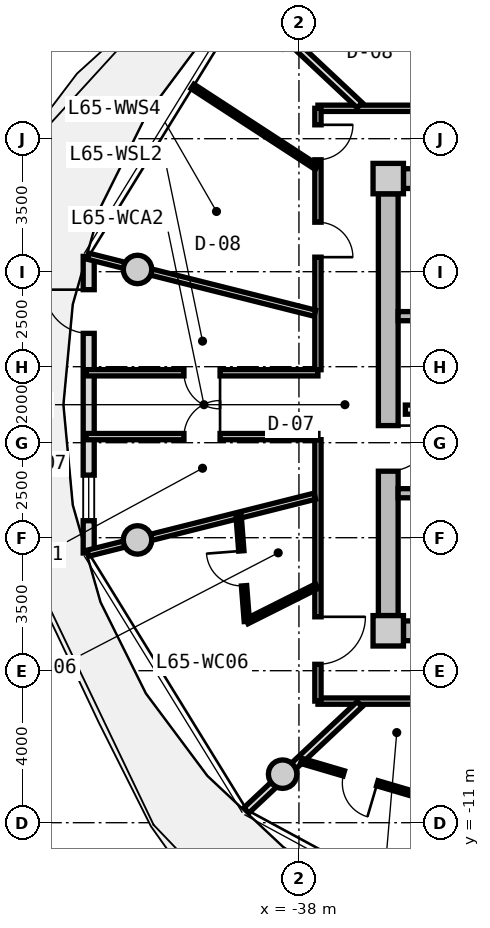
"""IFC4 building model, lengths in metres.
Left out: names, types, materials, properties, quantities, classifications, styles, units other than length and angle.
Written with IfcOpenShell. Run it as: python <this file> out.ifc"""

import sys

from ifc_helpers import new_model, si_unit, direction, frame, frame_2d, origin, origin_2d, place, context, subcontext, project, spatial, rectangle, circle, extrude, source, transform, mapped, element, fill, save


model = new_model("IFC4")
c1 = context("Model", 3, precision=1e-05, world=origin(), true_north=direction((0.0, 1.0)))
c2 = subcontext(c1, "Body", "Model", "MODEL_VIEW")
j1 = project(units=[si_unit("LENGTHUNIT", "METRE"), si_unit("PLANEANGLEUNIT", "RADIAN")], contexts=[c1])
p1 = place(None, origin())
s1 = spatial("IfcSite", under=j1, at=p1, CompositionType="ELEMENT")
p2 = place(p1, origin())
s2 = spatial("IfcBuilding", under=s1, at=p2, CompositionType="ELEMENT")
p3 = place(p2, frame((0.0, 0.0, 210.85)))
s3 = spatial("IfcBuildingStorey", under=s2, at=p3, CompositionType="ELEMENT", Elevation=210.85)
m1 = source(origin(), c2, "Body", "SweptSolid", [
    extrude(rectangle(XDim=0.8, YDim=0.8, at=origin_2d()), origin(), (0.0, 0.0, 1.0), 3.05),
])
for number, where, z_axis, x_axis in (
    (1, (-35.65, -5.95, 0.0), (0.0, 0.0, 1.0), (1.0, 0.0, 0.0)),
    (2, (-35.65, 5.95, 0.0), (0.0, 0.0, 1.0), (1.0, 0.0, 0.0)),
):
    element("IfcColumn", number, at=place(p3, frame(where, z_axis=z_axis, x_axis=x_axis)), inside=s3, PredefinedType="COLUMN", context=c2, shape_type="MappedRepresentation", body=[
        mapped(m1, transform((0.0, 0.0, 0.0), x_axis=(1.0, 0.0, 0.0), y_axis=(0.0, 1.0, 0.0), z_axis=(0.0, 0.0, 1.0), scale=1.0)),
    ])
m2 = source(origin(), c2, "Body", "SweptSolid", [
    extrude(rectangle(XDim=14.5, YDim=0.52, at=frame_2d((7.25, 0.0))), origin(), (0.0, 0.0, 1.0), 2.76),
])
for number, where, z_axis, x_axis in (
    (3, (-35.25, 5.95, 0.0), (0.0, 0.0, 1.0), (1.0, 0.0, 0.0)),
    (4, (-20.75, -5.95, 0.0), (0.0, 0.0, 1.0), (-1.0, 0.0, 0.0)),
):
    element("IfcWall", number, at=place(p3, frame(where, z_axis=z_axis, x_axis=x_axis)), inside=s3, PredefinedType="SHEAR", context=c2, shape_type="MappedRepresentation", body=[
        mapped(m2, transform((0.0, 0.0, 0.0), x_axis=(1.0, 0.0, 0.0), y_axis=(0.0, 1.0, 0.0), z_axis=(0.0, 0.0, 1.0), scale=1.0)),
    ])
m3 = source(origin(), c2, "Body", "SweptSolid", [
    extrude(rectangle(XDim=11.1, YDim=0.52, at=frame_2d((5.55, 0.0))), origin(), (0.0, 0.0, 1.0), 2.76),
])
p4 = place(p3, frame((-35.65, -5.55, 0.0), z_axis=(0.0, 0.0, 1.0), x_axis=(0.0, 1.0, 0.0)))
e5 = element("IfcWall", 5, at=p4, inside=s3, PredefinedType="SHEAR", context=c2, shape_type="MappedRepresentation", body=[
    mapped(m3, transform((0.0, 0.0, 0.0), x_axis=(1.0, 0.0, 0.0), y_axis=(0.0, 1.0, 0.0), z_axis=(0.0, 0.0, 1.0), scale=1.0)),
])
p5 = place(p4, frame((3.8, 0.0, 0.0)))
e6 = element("IfcOpeningElement", 6, at=p5, cuts=e5, PredefinedType="OPENING", context=c2, shape_type="SweptSolid", body=[
    extrude(rectangle(XDim=1.2, YDim=2.15, at=frame_2d((0.6, 1.075))), frame((0.0, 0.27, 0.0), z_axis=(0.0, -1.0, 0.0), x_axis=(1.0, 0.0, 0.0)), (0.0, 0.0, 1.0), 0.54),
])
m4 = source(origin(), c2, "Body", "SweptSolid", [
    extrude(circle(Radius=0.375, at=origin_2d()), origin(), (0.0, 0.0, 1.0), 3.05),
])
for number, where, z_axis, x_axis in (
    (7, (-42.247, 3.559, 0.0), (0.0, 0.0, 1.0), (1.0, 0.0, 0.0)),
    (8, (-42.247, -3.559, 0.0), (0.0, 0.0, 1.0), (1.0, 0.0, 0.0)),
    (9, (-38.43, -9.723, 0.0), (0.0, 0.0, 1.0), (1.0, 0.0, 0.0)),
):
    element("IfcColumn", number, at=place(p3, frame(where, z_axis=z_axis, x_axis=x_axis)), inside=s3, PredefinedType="COLUMN", context=c2, shape_type="MappedRepresentation", body=[
        mapped(m4, transform((0.0, 0.0, 0.0), x_axis=(1.0, 0.0, 0.0), y_axis=(0.0, 1.0, 0.0), z_axis=(0.0, 0.0, 1.0), scale=1.0)),
    ])
m5 = source(origin(), c2, "Body", "SweptSolid", [
    extrude(rectangle(XDim=7.806, YDim=0.29, at=frame_2d((3.903, 0.0))), origin(), (0.0, 0.0, 1.0), 2.76),
])
p6 = place(p3, frame((-43.532, -3.903, 0.0), z_axis=(0.0, 0.0, 1.0), x_axis=(0.0, 1.0, 0.0)))
e10 = element("IfcWall", 10, at=p6, inside=s3, PredefinedType="SOLIDWALL", context=c2, shape_type="MappedRepresentation", body=[
    mapped(m5, transform((0.0, 0.0, 0.0), x_axis=(1.0, 0.0, 0.0), y_axis=(0.0, 1.0, 0.0), z_axis=(0.0, 0.0, 1.0), scale=1.0)),
])
p7 = place(p6, frame((5.78, 0.0, 0.0)))
e11 = element("IfcOpeningElement", 11, at=p7, cuts=e10, PredefinedType="OPENING", context=c2, shape_type="SweptSolid", body=[
    extrude(rectangle(XDim=1.15, YDim=2.25, at=frame_2d((0.575, 1.125))), frame((0.0, 0.155, 0.0), z_axis=(0.0, -1.0, 0.0), x_axis=(1.0, 0.0, 0.0)), (0.0, 0.0, 1.0), 0.31),
])
p8 = place(p6, frame((0.85, 0.0, 0.85)))
e12 = element("IfcOpeningElement", 12, at=p8, cuts=e10, PredefinedType="OPENING", context=c2, shape_type="SweptSolid", body=[
    extrude(rectangle(XDim=1.2, YDim=1.5, at=frame_2d((0.6, 0.75))), frame((0.0, 0.155, 0.0), z_axis=(0.0, -1.0, 0.0), x_axis=(1.0, 0.0, 0.0)), (0.0, 0.0, 1.0), 0.31),
])
m6 = source(origin(), c2, "Body", "SweptSolid", [
    extrude(rectangle(XDim=7.93, YDim=0.24, at=frame_2d((3.965, 0.0))), origin(), (0.0, 0.0, 1.0), 2.76),
])
p9 = place(p3, frame((-35.39, 2.33, 0.0), z_axis=(0.0, 0.0, 1.0), x_axis=(1.0, 0.0, 0.0)))
e13 = element("IfcWall", 13, at=p9, inside=s3, PredefinedType="PARTITIONING", context=c2, shape_type="MappedRepresentation", body=[
    mapped(m6, transform((0.0, 0.0, 0.0), x_axis=(1.0, 0.0, 0.0), y_axis=(0.0, 1.0, 0.0), z_axis=(0.0, 0.0, 1.0), scale=1.0)),
])
p10 = place(p3, frame((-35.39, -2.33, 0.0), z_axis=(0.0, 0.0, 1.0), x_axis=(1.0, 0.0, 0.0)))
e14 = element("IfcWall", 14, at=p10, inside=s3, PredefinedType="PARTITIONING", context=c2, shape_type="MappedRepresentation", body=[
    mapped(m6, transform((0.0, 0.0, 0.0), x_axis=(1.0, 0.0, 0.0), y_axis=(0.0, 1.0, 0.0), z_axis=(0.0, 0.0, 1.0), scale=1.0)),
])
p11 = place(p10, frame((1.05, 0.0, 0.0)))
e15 = element("IfcOpeningElement", 15, at=p11, cuts=e14, PredefinedType="OPENING", context=c2, shape_type="SweptSolid", body=[
    extrude(rectangle(XDim=1.1, YDim=2.15, at=frame_2d((0.55, 1.075))), frame((0.0, 0.13, 0.0), z_axis=(0.0, -1.0, 0.0), x_axis=(1.0, 0.0, 0.0)), (0.0, 0.0, 1.0), 0.26),
])
m7 = source(origin(), c2, "Body", "SweptSolid", [
    extrude(rectangle(XDim=7.62, YDim=0.24, at=frame_2d((3.81, 0.0))), origin(), (0.0, 0.0, 1.0), 2.745),
])
p12 = place(p3, frame((-35.2, -0.13, 0.0), z_axis=(0.0, 0.0, 1.0), x_axis=(1.0, 0.0, 0.0)))
e16 = element("IfcWall", 16, at=p12, inside=s3, PredefinedType="PARTITIONING", context=c2, shape_type="MappedRepresentation", body=[
    mapped(m7, transform((0.0, 0.0, 0.0), x_axis=(1.0, 0.0, 0.0), y_axis=(0.0, 1.0, 0.0), z_axis=(0.0, 0.0, 1.0), scale=1.0)),
])
p13 = place(p12, frame((6.22, 0.0, 0.0)))
e17 = element("IfcOpeningElement", 17, at=p13, cuts=e16, PredefinedType="OPENING", context=c2, shape_type="SweptSolid", body=[
    extrude(rectangle(XDim=1.0, YDim=2.1, at=frame_2d((0.5, 1.05))), frame((0.0, 0.13, 0.0), z_axis=(0.0, -1.0, 0.0), x_axis=(1.0, 0.0, 0.0)), (0.0, 0.0, 1.0), 0.26),
])
p14 = place(p12, frame((2.4, 0.0, 0.0)))
e18 = element("IfcOpeningElement", 18, at=p14, cuts=e16, PredefinedType="OPENING", context=c2, shape_type="SweptSolid", body=[
    extrude(rectangle(XDim=1.0, YDim=2.1, at=frame_2d((0.5, 1.05))), frame((0.0, 0.13, 0.0), z_axis=(0.0, -1.0, 0.0), x_axis=(1.0, 0.0, 0.0)), (0.0, 0.0, 1.0), 0.26),
])
m8 = source(origin(), c2, "Body", "SweptSolid", [
    extrude(rectangle(XDim=8.58, YDim=0.165, at=frame_2d((4.29, 0.0))), origin(), (0.0, 0.0, 1.0), 2.745),
])
p15 = place(p3, frame((-37.5, 7.8, 0.0), z_axis=(0.0, 0.0, 1.0), x_axis=(1.0, 0.0, 0.0)))
e19 = element("IfcWall", 19, at=p15, inside=s3, PredefinedType="PARTITIONING", context=c2, shape_type="MappedRepresentation", body=[
    mapped(m8, transform((0.0, 0.0, 0.0), x_axis=(1.0, 0.0, 0.0), y_axis=(0.0, 1.0, 0.0), z_axis=(0.0, 0.0, 1.0), scale=1.0)),
])
p16 = place(p15, frame((3.528, 0.0, 0.0)))
e20 = element("IfcOpeningElement", 20, at=p16, cuts=e19, PredefinedType="OPENING", context=c2, shape_type="SweptSolid", body=[
    extrude(rectangle(XDim=1.25, YDim=2.2, at=frame_2d((0.625, 1.1))), frame((0.0, 0.093, 0.0), z_axis=(0.0, -1.0, 0.0), x_axis=(1.0, 0.0, 0.0)), (0.0, 0.0, 1.0), 0.185),
])
m9 = source(origin(), c2, "Body", "SweptSolid", [
    extrude(rectangle(XDim=19.0, YDim=0.165, at=frame_2d((9.5, 0.0))), origin(), (0.0, 0.0, 1.0), 2.745),
])
p17 = place(p3, frame((-18.5, -7.8, 0.0), z_axis=(0.0, 0.0, 1.0), x_axis=(-1.0, 0.0, 0.0)))
e21 = element("IfcWall", 21, at=p17, inside=s3, PredefinedType="PARTITIONING", context=c2, shape_type="MappedRepresentation", body=[
    mapped(m9, transform((0.0, 0.0, 0.0), x_axis=(1.0, 0.0, 0.0), y_axis=(0.0, 1.0, 0.0), z_axis=(0.0, 0.0, 1.0), scale=1.0)),
])
p18 = place(p17, frame((12.569, 0.0, 0.0)))
e22 = element("IfcOpeningElement", 22, at=p18, cuts=e21, PredefinedType="OPENING", context=c2, shape_type="SweptSolid", body=[
    extrude(rectangle(XDim=1.25, YDim=2.2, at=frame_2d((0.625, 1.1))), frame((0.0, 0.093, 0.0), z_axis=(0.0, -1.0, 0.0), x_axis=(1.0, 0.0, 0.0)), (0.0, 0.0, 1.0), 0.185),
])
p19 = place(p17, frame((8.875, 0.0, 0.0)))
e23 = element("IfcOpeningElement", 23, at=p19, cuts=e21, PredefinedType="OPENING", context=c2, shape_type="SweptSolid", body=[
    extrude(rectangle(XDim=1.25, YDim=2.2, at=frame_2d((0.625, 1.1))), frame((0.0, 0.093, 0.0), z_axis=(0.0, -1.0, 0.0), x_axis=(1.0, 0.0, 0.0)), (0.0, 0.0, 1.0), 0.185),
])
p20 = place(p17, frame((3.559, 0.0, 0.0)))
e24 = element("IfcOpeningElement", 24, at=p20, cuts=e21, PredefinedType="OPENING", context=c2, shape_type="SweptSolid", body=[
    extrude(rectangle(XDim=1.25, YDim=2.2, at=frame_2d((0.625, 1.1))), frame((0.0, 0.093, 0.0), z_axis=(0.0, -1.0, 0.0), x_axis=(1.0, 0.0, 0.0)), (0.0, 0.0, 1.0), 0.185),
])
m10 = source(origin(), c2, "Body", "SweptSolid", [
    extrude(rectangle(XDim=6.88, YDim=0.165, at=frame_2d((3.44, 0.0))), origin(), (0.0, 0.0, 1.0), 2.745),
])
p21 = place(p3, frame((-37.5, -7.8, 0.0), z_axis=(0.0, 0.0, 1.0), x_axis=(0.0, 1.0, 0.0)))
e25 = element("IfcWall", 25, at=p21, inside=s3, PredefinedType="PARTITIONING", context=c2, shape_type="MappedRepresentation", body=[
    mapped(m10, transform((0.0, 0.0, 0.0), x_axis=(1.0, 0.0, 0.0), y_axis=(0.0, 1.0, 0.0), z_axis=(0.0, 0.0, 1.0), scale=1.0)),
])
p22 = place(p21, frame((0.968, 0.0, 0.0)))
e26 = element("IfcOpeningElement", 26, at=p22, cuts=e25, PredefinedType="OPENING", context=c2, shape_type="SweptSolid", body=[
    extrude(rectangle(XDim=1.25, YDim=2.2, at=frame_2d((0.625, 1.1))), frame((0.0, 0.093, 0.0), z_axis=(0.0, -1.0, 0.0), x_axis=(1.0, 0.0, 0.0)), (0.0, 0.0, 1.0), 0.185),
])
p23 = place(p3, frame((-37.5, 0.92, 0.0), z_axis=(0.0, 0.0, 1.0), x_axis=(0.0, 1.0, 0.0)))
e27 = element("IfcWall", 27, at=p23, inside=s3, PredefinedType="PARTITIONING", context=c2, shape_type="MappedRepresentation", body=[
    mapped(m10, transform((0.0, 0.0, 0.0), x_axis=(1.0, 0.0, 0.0), y_axis=(0.0, 1.0, 0.0), z_axis=(0.0, 0.0, 1.0), scale=1.0)),
])
p24 = place(p23, frame((5.525, 0.0, 0.0)))
e28 = element("IfcOpeningElement", 28, at=p24, cuts=e27, PredefinedType="OPENING", context=c2, shape_type="SweptSolid", body=[
    extrude(rectangle(XDim=0.92, YDim=2.1, at=frame_2d((0.46, 1.05))), frame((0.0, 0.093, 0.0), z_axis=(0.0, -1.0, 0.0), x_axis=(1.0, 0.0, 0.0)), (0.0, 0.0, 1.0), 0.185),
])
p25 = place(p23, frame((2.962, 0.0, 0.0)))
e29 = element("IfcOpeningElement", 29, at=p25, cuts=e27, PredefinedType="OPENING", context=c2, shape_type="SweptSolid", body=[
    extrude(rectangle(XDim=0.92, YDim=2.1, at=frame_2d((0.46, 1.05))), frame((0.0, 0.093, 0.0), z_axis=(0.0, -1.0, 0.0), x_axis=(1.0, 0.0, 0.0)), (0.0, 0.0, 1.0), 0.185),
])
m11 = source(origin(), c2, "Body", "SweptSolid", [
    extrude(rectangle(XDim=6.157, YDim=0.165, at=frame_2d((3.079, 0.0))), origin(), (0.0, 0.0, 1.0), 2.345),
])
for number, where, z_axis, x_axis in (
    (30, (-37.58, 2.407, 0.0), (0.0, 0.0, 1.0), (-0.97, 0.244, 0.0)),
    (31, (-37.58, -2.407, 0.0), (0.0, 0.0, 1.0), (-0.97, -0.244, 0.0)),
):
    element("IfcWall", number, at=place(p3, frame(where, z_axis=z_axis, x_axis=x_axis)), inside=s3, PredefinedType="PARTITIONING", context=c2, shape_type="MappedRepresentation", body=[
        mapped(m11, transform((0.0, 0.0, 0.0), x_axis=(1.0, 0.0, 0.0), y_axis=(0.0, 1.0, 0.0), z_axis=(0.0, 0.0, 1.0), scale=1.0)),
    ])
m12 = source(origin(), c2, "Body", "SweptSolid", [
    extrude(rectangle(XDim=6.101, YDim=0.165, at=frame_2d((3.051, 0.0))), origin(), (0.0, 0.0, 1.0), 2.745),
])
p26 = place(p3, frame((-43.601, 0.84, 0.0), z_axis=(0.0, 0.0, 1.0), x_axis=(1.0, 0.0, 0.0)))
e32 = element("IfcWall", 32, at=p26, inside=s3, PredefinedType="PARTITIONING", context=c2, shape_type="MappedRepresentation", body=[
    mapped(m12, transform((0.0, 0.0, 0.0), x_axis=(1.0, 0.0, 0.0), y_axis=(0.0, 1.0, 0.0), z_axis=(0.0, 0.0, 1.0), scale=1.0)),
])
p27 = place(p26, frame((2.576, 0.0, 0.0)))
e33 = element("IfcOpeningElement", 33, at=p27, cuts=e32, PredefinedType="OPENING", context=c2, shape_type="SweptSolid", body=[
    extrude(rectangle(XDim=0.95, YDim=2.1, at=frame_2d((0.475, 1.05))), frame((0.0, 0.093, 0.0), z_axis=(0.0, -1.0, 0.0), x_axis=(1.0, 0.0, 0.0)), (0.0, 0.0, 1.0), 0.185),
])
p28 = place(p3, frame((-37.5, -0.84, 0.0), z_axis=(0.0, 0.0, 1.0), x_axis=(-1.0, 0.0, 0.0)))
e34 = element("IfcWall", 34, at=p28, inside=s3, PredefinedType="PARTITIONING", context=c2, shape_type="MappedRepresentation", body=[
    mapped(m12, transform((0.0, 0.0, 0.0), x_axis=(1.0, 0.0, 0.0), y_axis=(0.0, 1.0, 0.0), z_axis=(0.0, 0.0, 1.0), scale=1.0)),
])
p29 = place(p28, frame((2.576, 0.0, 0.0)))
e35 = element("IfcOpeningElement", 35, at=p29, cuts=e34, PredefinedType="OPENING", context=c2, shape_type="SweptSolid", body=[
    extrude(rectangle(XDim=0.95, YDim=2.1, at=frame_2d((0.475, 1.05))), frame((0.0, 0.093, 0.0), z_axis=(0.0, -1.0, 0.0), x_axis=(1.0, 0.0, 0.0)), (0.0, 0.0, 1.0), 0.185),
])
m13 = source(origin(), c2, "Body", "SweptSolid", [
    extrude(rectangle(XDim=4.089, YDim=0.19, at=frame_2d((2.044, 0.0))), origin(), (0.0, 0.0, 1.0), 2.345),
])
p30 = place(p3, frame((-36.402, 7.88, 0.0), z_axis=(0.0, 0.0, 1.0), x_axis=(-0.729401273609, 0.684086092577, 0.0)))
e36 = element("IfcWall", 36, at=p30, inside=s3, PredefinedType="PARTITIONING", context=c2, shape_type="MappedRepresentation", body=[
    mapped(m13, transform((0.0, 0.0, 0.0), x_axis=(1.0, 0.0, 0.0), y_axis=(0.0, 1.0, 0.0), z_axis=(0.0, 0.0, 1.0), scale=1.0)),
])
m14 = source(origin(), c2, "Body", "SweptSolid", [
    extrude(rectangle(XDim=3.904, YDim=0.14, at=frame_2d((1.952, 0.0))), origin(), (0.0, 0.0, 1.0), 2.745),
])
p31 = place(p3, frame((-37.53, 6.246, 0.0), z_axis=(0.0, 0.0, 1.0), x_axis=(-0.838024687996, 0.545632314209, 0.0)))
e37 = element("IfcWall", 37, at=p31, inside=s3, PredefinedType="PARTITIONING", context=c2, shape_type="MappedRepresentation", body=[
    mapped(m14, transform((0.0, 0.0, 0.0), x_axis=(1.0, 0.0, 0.0), y_axis=(0.0, 1.0, 0.0), z_axis=(0.0, 0.0, 1.0), scale=1.0)),
])
p32 = place(p3, frame((-36.402, -7.88, 0.0), z_axis=(0.0, 0.0, 1.0), x_axis=(-0.729401273609, -0.684086092577, 0.0)))
e38 = element("IfcWall", 38, at=p32, inside=s3, PredefinedType="PARTITIONING", context=c2, shape_type="MappedRepresentation", body=[
    mapped(m13, transform((0.0, 0.0, 0.0), x_axis=(1.0, 0.0, 0.0), y_axis=(0.0, 1.0, 0.0), z_axis=(0.0, 0.0, 1.0), scale=1.0)),
])
m15 = source(origin(), c2, "Body", "SweptSolid", [
    extrude(rectangle(XDim=2.06, YDim=0.14, at=frame_2d((1.03, 0.0))), origin(), (0.0, 0.0, 1.0), 2.745),
])
p33 = place(p3, frame((-37.53, -4.778, 0.0), z_axis=(0.0, 0.0, 1.0), x_axis=(-0.893952568722, -0.448161583444, 0.0)))
e39 = element("IfcWall", 39, at=p33, inside=s3, PredefinedType="PARTITIONING", context=c2, shape_type="MappedRepresentation", body=[
    mapped(m15, transform((0.0, 0.0, 0.0), x_axis=(1.0, 0.0, 0.0), y_axis=(0.0, 1.0, 0.0), z_axis=(0.0, 0.0, 1.0), scale=1.0)),
])
m16 = source(origin(), c2, "Body", "SweptSolid", [
    extrude(rectangle(XDim=2.798, YDim=0.14, at=frame_2d((1.399, 0.0))), origin(), (0.0, 0.0, 1.0), 2.745),
])
p34 = place(p3, frame((-39.371, -5.701, 0.0), z_axis=(0.0, 0.0, 1.0), x_axis=(-0.077823984089, 0.996967114553, 0.0)))
e40 = element("IfcWall", 40, at=p34, inside=s3, PredefinedType="PARTITIONING", context=c2, shape_type="MappedRepresentation", body=[
    mapped(m16, transform((0.0, 0.0, 0.0), x_axis=(1.0, 0.0, 0.0), y_axis=(0.0, 1.0, 0.0), z_axis=(0.0, 0.0, 1.0), scale=1.0)),
])
p35 = place(p34, frame((0.939, 0.0, 0.0)))
e41 = element("IfcOpeningElement", 41, at=p35, cuts=e40, PredefinedType="OPENING", context=c2, shape_type="SweptSolid", body=[
    extrude(rectangle(XDim=0.92, YDim=2.1, at=frame_2d((0.46, 1.05))), frame((0.0, 0.08, 0.0), z_axis=(0.0, -1.0, 0.0), x_axis=(1.0, 0.0, 0.0)), (0.0, 0.0, 1.0), 0.16),
])
m17 = source(origin(), c2, "Body", "SweptSolid", [
    extrude(rectangle(XDim=3.252, YDim=0.14, at=frame_2d((1.626, 0.0))), origin(), (0.0, 0.0, 1.0), 2.745),
])
p36 = place(p3, frame((-34.82, -10.291, 0.0), z_axis=(0.0, 0.0, 1.0), x_axis=(-0.959294945864, 0.282406102695, 0.0)))
e42 = element("IfcWall", 42, at=p36, inside=s3, PredefinedType="PARTITIONING", context=c2, shape_type="MappedRepresentation", body=[
    mapped(m17, transform((0.0, 0.0, 0.0), x_axis=(1.0, 0.0, 0.0), y_axis=(0.0, 1.0, 0.0), z_axis=(0.0, 0.0, 1.0), scale=1.0)),
])
p37 = place(p36, frame((1.166, 0.0, 0.0)))
e43 = element("IfcOpeningElement", 43, at=p37, cuts=e42, PredefinedType="OPENING", context=c2, shape_type="SweptSolid", body=[
    extrude(rectangle(XDim=0.92, YDim=2.1, at=frame_2d((0.46, 1.05))), frame((0.0, 0.08, 0.0), z_axis=(0.0, -1.0, 0.0), x_axis=(1.0, 0.0, 0.0)), (0.0, 0.0, 1.0), 0.16),
])
m18 = source(origin(), c2, "Body", "SweptSolid", [
    extrude(rectangle(XDim=1.15, YDim=2.25, at=frame_2d((0.575, 1.125))), frame((0.0, 0.025, 0.0), z_axis=(0.0, -1.0, 0.0), x_axis=(1.0, 0.0, 0.0)), (0.0, 0.0, 1.0), 0.05),
])
p38 = place(p7, origin())
e44 = element("IfcDoor", 44, at=p38, inside=s3, OperationType="SINGLE_SWING_RIGHT", PredefinedType="DOOR", context=c2, shape_type="MappedRepresentation", body=[
    mapped(m18, transform((0.0, 0.0, 0.0), x_axis=(1.0, 0.0, 0.0), y_axis=(0.0, 1.0, 0.0), z_axis=(0.0, 0.0, 1.0), scale=1.0)),
])
fill(e11, e44)
m19 = source(origin(), c2, "Body", "SweptSolid", [
    extrude(rectangle(XDim=1.2, YDim=1.5, at=frame_2d((0.6, 0.75))), frame((0.0, 0.03, 0.0), z_axis=(0.0, -1.0, 0.0), x_axis=(1.0, 0.0, 0.0)), (0.0, 0.0, 1.0), 0.06),
])
p39 = place(p8, origin())
e45 = element("IfcWindow", 45, at=p39, inside=s3, PartitioningType="SINGLE_PANEL", PredefinedType="WINDOW", context=c2, shape_type="MappedRepresentation", body=[
    mapped(m19, transform((0.0, 0.0, 0.0), x_axis=(1.0, 0.0, 0.0), y_axis=(0.0, 1.0, 0.0), z_axis=(0.0, 0.0, 1.0), scale=1.0)),
])
fill(e12, e45)
m20 = source(origin(), c2, "Body", "SweptSolid", [
    extrude(rectangle(XDim=1.2, YDim=2.15, at=frame_2d((0.6, 1.075))), frame((0.0, 0.025, 0.0), z_axis=(0.0, -1.0, 0.0), x_axis=(1.0, 0.0, 0.0)), (0.0, 0.0, 1.0), 0.05),
])
p40 = place(p5, frame((1.2, 0.0, 0.0), z_axis=(0.0, 0.0, 1.0), x_axis=(-1.0, 0.0, 0.0)))
e46 = element("IfcDoor", 46, at=p40, inside=s3, OperationType="SINGLE_SWING_LEFT", PredefinedType="DOOR", context=c2, shape_type="MappedRepresentation", body=[
    mapped(m20, transform((0.0, 0.0, 0.0), x_axis=(1.0, 0.0, 0.0), y_axis=(0.0, 1.0, 0.0), z_axis=(0.0, 0.0, 1.0), scale=1.0)),
])
fill(e6, e46)
m21 = source(origin(), c2, "Body", "SweptSolid", [
    extrude(rectangle(XDim=0.95, YDim=2.1, at=frame_2d((0.475, 1.05))), frame((0.0, 0.025, 0.0), z_axis=(0.0, -1.0, 0.0), x_axis=(1.0, 0.0, 0.0)), (0.0, 0.0, 1.0), 0.05),
])
p41 = place(p29, frame((0.95, 0.0, 0.0), z_axis=(0.0, 0.0, 1.0), x_axis=(-1.0, 0.0, 0.0)))
e47 = element("IfcDoor", 47, at=p41, inside=s3, OperationType="SINGLE_SWING_RIGHT", PredefinedType="DOOR", context=c2, shape_type="MappedRepresentation", body=[
    mapped(m21, transform((0.0, 0.0, 0.0), x_axis=(1.0, 0.0, 0.0), y_axis=(0.0, 1.0, 0.0), z_axis=(0.0, 0.0, 1.0), scale=1.0)),
])
fill(e35, e47)
p42 = place(p27, frame((0.95, 0.0, 0.0), z_axis=(0.0, 0.0, 1.0), x_axis=(-1.0, 0.0, 0.0)))
e48 = element("IfcDoor", 48, at=p42, inside=s3, OperationType="SINGLE_SWING_LEFT", PredefinedType="DOOR", context=c2, shape_type="MappedRepresentation", body=[
    mapped(m21, transform((0.0, 0.0, 0.0), x_axis=(1.0, 0.0, 0.0), y_axis=(0.0, 1.0, 0.0), z_axis=(0.0, 0.0, 1.0), scale=1.0)),
])
fill(e33, e48)
m22 = source(origin(), c2, "Body", "SweptSolid", [
    extrude(rectangle(XDim=0.92, YDim=2.1, at=frame_2d((0.46, 1.05))), frame((0.0, 0.025, 0.0), z_axis=(0.0, -1.0, 0.0), x_axis=(1.0, 0.0, 0.0)), (0.0, 0.0, 1.0), 0.05),
])
p43 = place(p24, frame((0.92, 0.0, 0.0), z_axis=(0.0, 0.0, 1.0), x_axis=(-1.0, 0.0, 0.0)))
e49 = element("IfcDoor", 49, at=p43, inside=s3, OperationType="SINGLE_SWING_LEFT", PredefinedType="DOOR", context=c2, shape_type="MappedRepresentation", body=[
    mapped(m22, transform((0.0, 0.0, 0.0), x_axis=(1.0, 0.0, 0.0), y_axis=(0.0, 1.0, 0.0), z_axis=(0.0, 0.0, 1.0), scale=1.0)),
])
fill(e28, e49)
p44 = place(p25, frame((0.92, 0.0, 0.0), z_axis=(0.0, 0.0, 1.0), x_axis=(-1.0, 0.0, 0.0)))
e50 = element("IfcDoor", 50, at=p44, inside=s3, OperationType="SINGLE_SWING_RIGHT", PredefinedType="DOOR", context=c2, shape_type="MappedRepresentation", body=[
    mapped(m22, transform((0.0, 0.0, 0.0), x_axis=(1.0, 0.0, 0.0), y_axis=(0.0, 1.0, 0.0), z_axis=(0.0, 0.0, 1.0), scale=1.0)),
])
fill(e29, e50)
m23 = source(origin(), c2, "Body", "SweptSolid", [
    extrude(rectangle(XDim=1.25, YDim=2.2, at=frame_2d((0.625, 1.1))), frame((0.0, 0.025, 0.0), z_axis=(0.0, -1.0, 0.0), x_axis=(1.0, 0.0, 0.0)), (0.0, 0.0, 1.0), 0.05),
])
p45 = place(p22, frame((1.25, 0.0, 0.0), z_axis=(0.0, 0.0, 1.0), x_axis=(-1.0, 0.0, 0.0)))
e51 = element("IfcDoor", 51, at=p45, inside=s3, OperationType="SINGLE_SWING_LEFT", PredefinedType="DOOR", context=c2, shape_type="MappedRepresentation", body=[
    mapped(m23, transform((0.0, 0.0, 0.0), x_axis=(1.0, 0.0, 0.0), y_axis=(0.0, 1.0, 0.0), z_axis=(0.0, 0.0, 1.0), scale=1.0)),
])
fill(e26, e51)
p46 = place(p35, origin())
e52 = element("IfcDoor", 52, at=p46, inside=s3, OperationType="SINGLE_SWING_RIGHT", PredefinedType="DOOR", context=c2, shape_type="MappedRepresentation", body=[
    mapped(m22, transform((0.0, 0.0, 0.0), x_axis=(1.0, 0.0, 0.0), y_axis=(0.0, 1.0, 0.0), z_axis=(0.0, 0.0, 1.0), scale=1.0)),
])
fill(e41, e52)
p47 = place(p37, origin())
e53 = element("IfcDoor", 53, at=p47, inside=s3, OperationType="SINGLE_SWING_LEFT", PredefinedType="DOOR", context=c2, shape_type="MappedRepresentation", body=[
    mapped(m22, transform((0.0, 0.0, 0.0), x_axis=(1.0, 0.0, 0.0), y_axis=(0.0, 1.0, 0.0), z_axis=(0.0, 0.0, 1.0), scale=1.0)),
])
fill(e43, e53)
save(model, sys.argv[1])
